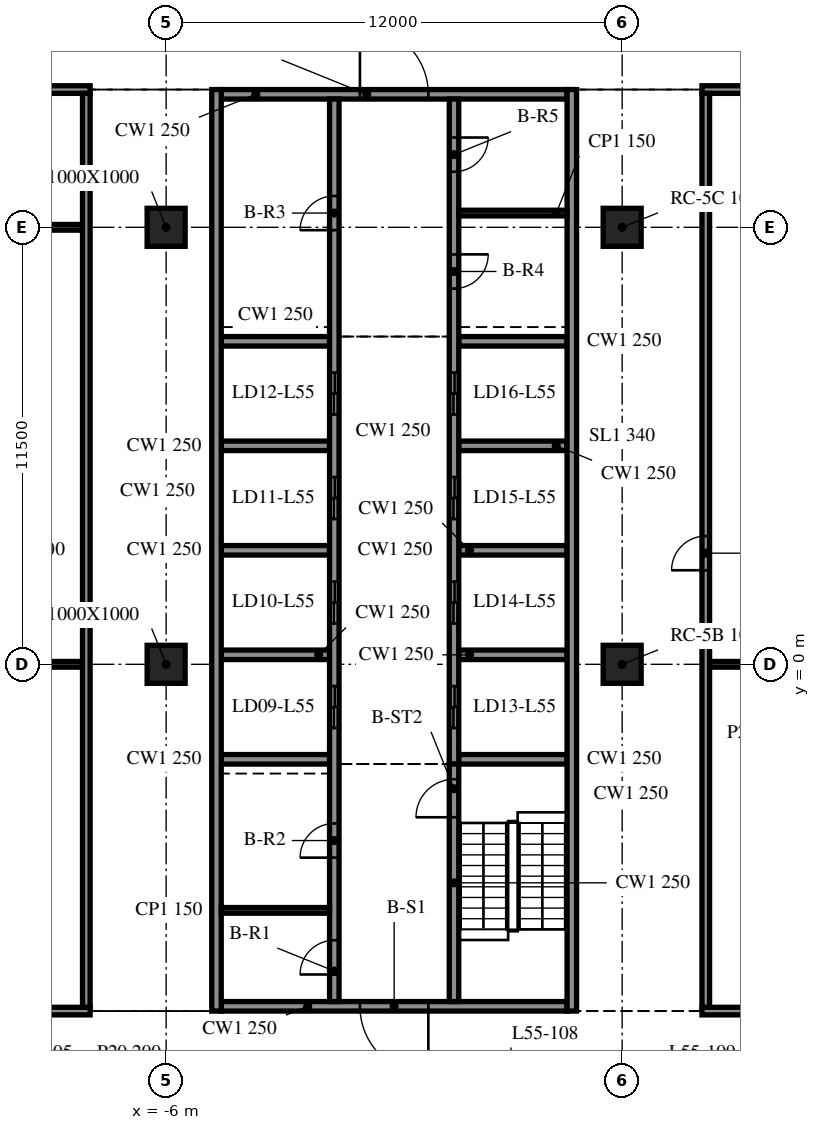
"""IFC4 building model, lengths in metres.
Left out: names, types, materials, properties, quantities, classifications, styles, units other than length and angle.
Written with IfcOpenShell. Run it as: python <this file> out.ifc"""

import sys

from ifc_helpers import new_model, si_unit, direction, frame, frame_2d, origin, origin_2d, place, context, subcontext, project, spatial, rectangle, extrude, element, fill, save


model = new_model("IFC4")
c1 = context("Model", 3, precision=1e-05, world=origin(), true_north=direction((0.0, 1.0)))
c2 = subcontext(c1, "Body", "Model", "MODEL_VIEW")
j1 = project(units=[si_unit("LENGTHUNIT", "METRE"), si_unit("PLANEANGLEUNIT", "RADIAN")], contexts=[c1])
p1 = place(None, origin())
s1 = spatial("IfcSite", under=j1, at=p1, CompositionType="ELEMENT")
p2 = place(p1, origin())
s2 = spatial("IfcBuilding", under=s1, at=p2, CompositionType="ELEMENT")
p3 = place(p2, frame((0.0, 0.0, 228.6)))
s3 = spatial("IfcBuildingStorey", under=s2, at=p3, CompositionType="ELEMENT", Elevation=228.6)
for number, where, z_axis, x_axis in (
    (1, (-6.0, 0.0, -0.34), (0.0, 0.0, 1.0), (1.0, 0.0, 0.0)),
    (2, (-6.0, 11.5, -0.34), (0.0, 0.0, 1.0), (1.0, 0.0, 0.0)),
    (3, (6.0, 0.0, -0.34), (0.0, 0.0, 1.0), (1.0, 0.0, 0.0)),
    (4, (6.0, 11.5, -0.34), (0.0, 0.0, 1.0), (1.0, 0.0, 0.0)),
):
    element("IfcColumn", number, at=place(p3, frame(where, z_axis=z_axis, x_axis=x_axis)), inside=s3, PredefinedType="COLUMN", context=c2, shape_type="SweptSolid", body=[
        extrude(rectangle(XDim=1.0, YDim=1.0, at=origin_2d()), origin(), (0.0, 0.0, 1.0), 3.8),
    ])
for number, where, z_axis, x_axis in (
    (5, (-4.675, 15.125, 0.0), (0.0, 0.0, 1.0), (0.0, -1.0, 0.0)),
    (6, (4.675, -9.125, 0.0), (0.0, 0.0, 1.0), (0.0, 1.0, 0.0)),
):
    element("IfcWall", number, at=place(p3, frame(where, z_axis=z_axis, x_axis=x_axis)), inside=s3, PredefinedType="SOLIDWALL", context=c2, shape_type="SweptSolid", body=[
        extrude(rectangle(XDim=24.25, YDim=0.25, at=frame_2d((12.125, 0.0))), origin(), (0.0, 0.0, 1.0), 3.46),
    ])
p4 = place(p3, frame((4.55, -9.0, 0.0), z_axis=(0.0, 0.0, 1.0), x_axis=(-1.0, 0.0, 0.0)))
e7 = element("IfcWall", 7, at=p4, inside=s3, PredefinedType="SOLIDWALL", context=c2, shape_type="SweptSolid", body=[
    extrude(rectangle(XDim=9.1, YDim=0.25, at=frame_2d((4.55, 0.0))), origin(), (0.0, 0.0, 1.0), 3.46),
])
p5 = place(p4, frame((3.65, 0.0, 0.0)))
e8 = element("IfcOpeningElement", 8, at=p5, cuts=e7, PredefinedType="OPENING", context=c2, shape_type="SweptSolid", body=[
    extrude(rectangle(XDim=1.8, YDim=2.1, at=frame_2d((0.9, 1.05))), frame((0.0, 0.135, 0.0), z_axis=(0.0, -1.0, 0.0), x_axis=(1.0, 0.0, 0.0)), (0.0, 0.0, 1.0), 0.27),
])
p6 = place(p3, frame((-4.55, 15.0, 0.0), z_axis=(0.0, 0.0, 1.0), x_axis=(1.0, 0.0, 0.0)))
e9 = element("IfcWall", 9, at=p6, inside=s3, PredefinedType="SOLIDWALL", context=c2, shape_type="SweptSolid", body=[
    extrude(rectangle(XDim=9.1, YDim=0.25, at=frame_2d((4.55, 0.0))), origin(), (0.0, 0.0, 1.0), 3.46),
])
p7 = place(p6, frame((3.65, 0.0, 0.0)))
e10 = element("IfcOpeningElement", 10, at=p7, cuts=e9, PredefinedType="OPENING", context=c2, shape_type="SweptSolid", body=[
    extrude(rectangle(XDim=1.8, YDim=2.1, at=frame_2d((0.9, 1.05))), frame((0.0, 0.135, 0.0), z_axis=(0.0, -1.0, 0.0), x_axis=(1.0, 0.0, 0.0)), (0.0, 0.0, 1.0), 0.27),
])
p8 = place(p3, frame((-1.575, -8.875, 0.0), z_axis=(0.0, 0.0, 1.0), x_axis=(0.0, 1.0, 0.0)))
e11 = element("IfcWall", 11, at=p8, inside=s3, PredefinedType="SOLIDWALL", context=c2, shape_type="SweptSolid", body=[
    extrude(rectangle(XDim=23.75, YDim=0.25, at=frame_2d((11.875, 0.0))), origin(), (0.0, 0.0, 1.0), 3.46),
])
p9 = place(p8, frame((7.2, 0.0, 0.0)))
e12 = element("IfcOpeningElement", 12, at=p9, cuts=e11, PredefinedType="OPENING", context=c2, shape_type="SweptSolid", body=[
    extrude(rectangle(XDim=1.1, YDim=2.1, at=frame_2d((0.55, 1.05))), frame((0.0, 0.135, 0.0), z_axis=(0.0, -1.0, 0.0), x_axis=(1.0, 0.0, 0.0)), (0.0, 0.0, 1.0), 0.27),
])
p10 = place(p8, frame((9.95, 0.0, 0.0)))
e13 = element("IfcOpeningElement", 13, at=p10, cuts=e11, PredefinedType="OPENING", context=c2, shape_type="SweptSolid", body=[
    extrude(rectangle(XDim=1.1, YDim=2.1, at=frame_2d((0.55, 1.05))), frame((0.0, 0.135, 0.0), z_axis=(0.0, -1.0, 0.0), x_axis=(1.0, 0.0, 0.0)), (0.0, 0.0, 1.0), 0.27),
])
p11 = place(p8, frame((12.7, 0.0, 0.0)))
e14 = element("IfcOpeningElement", 14, at=p11, cuts=e11, PredefinedType="OPENING", context=c2, shape_type="SweptSolid", body=[
    extrude(rectangle(XDim=1.1, YDim=2.1, at=frame_2d((0.55, 1.05))), frame((0.0, 0.135, 0.0), z_axis=(0.0, -1.0, 0.0), x_axis=(1.0, 0.0, 0.0)), (0.0, 0.0, 1.0), 0.27),
])
p12 = place(p8, frame((15.45, 0.0, 0.0)))
e15 = element("IfcOpeningElement", 15, at=p12, cuts=e11, PredefinedType="OPENING", context=c2, shape_type="SweptSolid", body=[
    extrude(rectangle(XDim=1.1, YDim=2.1, at=frame_2d((0.55, 1.05))), frame((0.0, 0.135, 0.0), z_axis=(0.0, -1.0, 0.0), x_axis=(1.0, 0.0, 0.0)), (0.0, 0.0, 1.0), 0.27),
])
p13 = place(p8, frame((0.712, 0.0, 0.0)))
e16 = element("IfcOpeningElement", 16, at=p13, cuts=e11, PredefinedType="OPENING", context=c2, shape_type="SweptSolid", body=[
    extrude(rectangle(XDim=0.9, YDim=2.1, at=frame_2d((0.45, 1.05))), frame((0.0, 0.135, 0.0), z_axis=(0.0, -1.0, 0.0), x_axis=(1.0, 0.0, 0.0)), (0.0, 0.0, 1.0), 0.27),
])
p14 = place(p8, frame((3.788, 0.0, 0.0)))
e17 = element("IfcOpeningElement", 17, at=p14, cuts=e11, PredefinedType="OPENING", context=c2, shape_type="SweptSolid", body=[
    extrude(rectangle(XDim=0.9, YDim=2.1, at=frame_2d((0.45, 1.05))), frame((0.0, 0.135, 0.0), z_axis=(0.0, -1.0, 0.0), x_axis=(1.0, 0.0, 0.0)), (0.0, 0.0, 1.0), 0.27),
])
p15 = place(p8, frame((20.3, 0.0, 0.0)))
e18 = element("IfcOpeningElement", 18, at=p15, cuts=e11, PredefinedType="OPENING", context=c2, shape_type="SweptSolid", body=[
    extrude(rectangle(XDim=0.9, YDim=2.1, at=frame_2d((0.45, 1.05))), frame((0.0, 0.135, 0.0), z_axis=(0.0, -1.0, 0.0), x_axis=(1.0, 0.0, 0.0)), (0.0, 0.0, 1.0), 0.27),
])
p16 = place(p3, frame((1.575, -8.875, 0.0), z_axis=(0.0, 0.0, 1.0), x_axis=(0.0, 1.0, 0.0)))
e19 = element("IfcWall", 19, at=p16, inside=s3, PredefinedType="SOLIDWALL", context=c2, shape_type="SweptSolid", body=[
    extrude(rectangle(XDim=6.25, YDim=0.25, at=frame_2d((3.125, 0.0))), origin(), (0.0, 0.0, 1.0), 3.46),
])
p17 = place(p16, frame((4.85, 0.0, 0.0)))
e20 = element("IfcOpeningElement", 20, at=p17, cuts=e19, PredefinedType="OPENING", context=c2, shape_type="SweptSolid", body=[
    extrude(rectangle(XDim=1.0, YDim=2.1, at=frame_2d((0.5, 1.05))), frame((0.0, 0.135, 0.0), z_axis=(0.0, -1.0, 0.0), x_axis=(1.0, 0.0, 0.0)), (0.0, 0.0, 1.0), 0.27),
])
p18 = place(p3, frame((1.575, 14.875, 0.0), z_axis=(0.0, 0.0, 1.0), x_axis=(0.0, -1.0, 0.0)))
e21 = element("IfcWall", 21, at=p18, inside=s3, PredefinedType="SOLIDWALL", context=c2, shape_type="SweptSolid", body=[
    extrude(rectangle(XDim=17.5, YDim=0.25, at=frame_2d((8.75, 0.0))), origin(), (0.0, 0.0, 1.0), 3.46),
])
p19 = place(p18, frame((15.45, 0.0, 0.0)))
e22 = element("IfcOpeningElement", 22, at=p19, cuts=e21, PredefinedType="OPENING", context=c2, shape_type="SweptSolid", body=[
    extrude(rectangle(XDim=1.1, YDim=2.1, at=frame_2d((0.55, 1.05))), frame((0.0, 0.135, 0.0), z_axis=(0.0, -1.0, 0.0), x_axis=(1.0, 0.0, 0.0)), (0.0, 0.0, 1.0), 0.27),
])
p20 = place(p18, frame((12.7, 0.0, 0.0)))
e23 = element("IfcOpeningElement", 23, at=p20, cuts=e21, PredefinedType="OPENING", context=c2, shape_type="SweptSolid", body=[
    extrude(rectangle(XDim=1.1, YDim=2.1, at=frame_2d((0.55, 1.05))), frame((0.0, 0.135, 0.0), z_axis=(0.0, -1.0, 0.0), x_axis=(1.0, 0.0, 0.0)), (0.0, 0.0, 1.0), 0.27),
])
p21 = place(p18, frame((9.95, 0.0, 0.0)))
e24 = element("IfcOpeningElement", 24, at=p21, cuts=e21, PredefinedType="OPENING", context=c2, shape_type="SweptSolid", body=[
    extrude(rectangle(XDim=1.1, YDim=2.1, at=frame_2d((0.55, 1.05))), frame((0.0, 0.135, 0.0), z_axis=(0.0, -1.0, 0.0), x_axis=(1.0, 0.0, 0.0)), (0.0, 0.0, 1.0), 0.27),
])
p22 = place(p18, frame((7.2, 0.0, 0.0)))
e25 = element("IfcOpeningElement", 25, at=p22, cuts=e21, PredefinedType="OPENING", context=c2, shape_type="SweptSolid", body=[
    extrude(rectangle(XDim=1.1, YDim=2.1, at=frame_2d((0.55, 1.05))), frame((0.0, 0.135, 0.0), z_axis=(0.0, -1.0, 0.0), x_axis=(1.0, 0.0, 0.0)), (0.0, 0.0, 1.0), 0.27),
])
p23 = place(p18, frame((4.087, 0.0, 0.0)))
e26 = element("IfcOpeningElement", 26, at=p23, cuts=e21, PredefinedType="OPENING", context=c2, shape_type="SweptSolid", body=[
    extrude(rectangle(XDim=0.9, YDim=2.1, at=frame_2d((0.45, 1.05))), frame((0.0, 0.135, 0.0), z_axis=(0.0, -1.0, 0.0), x_axis=(1.0, 0.0, 0.0)), (0.0, 0.0, 1.0), 0.27),
])
p24 = place(p18, frame((1.012, 0.0, 0.0)))
e27 = element("IfcOpeningElement", 27, at=p24, cuts=e21, PredefinedType="OPENING", context=c2, shape_type="SweptSolid", body=[
    extrude(rectangle(XDim=0.9, YDim=2.1, at=frame_2d((0.45, 1.05))), frame((0.0, 0.135, 0.0), z_axis=(0.0, -1.0, 0.0), x_axis=(1.0, 0.0, 0.0)), (0.0, 0.0, 1.0), 0.27),
])
for number, where, z_axis, x_axis in (
    (28, (-4.55, -2.5, 0.0), (0.0, 0.0, 1.0), (1.0, 0.0, 0.0)),
    (29, (-4.55, 0.25, 0.0), (0.0, 0.0, 1.0), (1.0, 0.0, 0.0)),
    (30, (-4.55, 3.0, 0.0), (0.0, 0.0, 1.0), (1.0, 0.0, 0.0)),
    (31, (-4.55, 5.75, 0.0), (0.0, 0.0, 1.0), (1.0, 0.0, 0.0)),
    (32, (-4.55, 8.5, 0.0), (0.0, 0.0, 1.0), (1.0, 0.0, 0.0)),
    (33, (1.7, -2.5, 0.0), (0.0, 0.0, 1.0), (1.0, 0.0, 0.0)),
    (34, (1.7, 0.25, 0.0), (0.0, 0.0, 1.0), (1.0, 0.0, 0.0)),
    (35, (1.7, 3.0, 0.0), (0.0, 0.0, 1.0), (1.0, 0.0, 0.0)),
    (36, (1.7, 5.75, 0.0), (0.0, 0.0, 1.0), (1.0, 0.0, 0.0)),
    (37, (1.7, 8.5, 0.0), (0.0, 0.0, 1.0), (1.0, 0.0, 0.0)),
):
    element("IfcWall", number, at=place(p3, frame(where, z_axis=z_axis, x_axis=x_axis)), inside=s3, PredefinedType="SOLIDWALL", context=c2, shape_type="SweptSolid", body=[
        extrude(rectangle(XDim=2.85, YDim=0.25, at=frame_2d((1.425, 0.0))), origin(), (0.0, 0.0, 1.0), 3.46),
    ])
for number, where, z_axis, x_axis in (
    (38, (-4.55, -6.475, 0.0), (0.0, 0.0, 1.0), (1.0, 0.0, 0.0)),
    (39, (1.7, 11.875, 0.0), (0.0, 0.0, 1.0), (1.0, 0.0, 0.0)),
):
    element("IfcWall", number, at=place(p3, frame(where, z_axis=z_axis, x_axis=x_axis)), inside=s3, PredefinedType="PARTITIONING", context=c2, shape_type="SweptSolid", body=[
        extrude(rectangle(XDim=2.85, YDim=0.15, at=frame_2d((1.425, 0.0))), origin(), (0.0, 0.0, 1.0), 3.46),
    ])
p25 = place(p3, frame((-16.1, -9.125, 0.0), z_axis=(0.0, 0.0, 1.0), x_axis=(1.0, 0.0, 0.0)))
e40 = element("IfcWall", 40, at=p25, inside=s3, PredefinedType="PARTITIONING", context=c2, shape_type="SweptSolid", body=[
    extrude(rectangle(XDim=8.1, YDim=0.2, at=frame_2d((4.05, 0.0))), origin(), (0.0, 0.0, 1.0), 3.46),
])
p26 = place(p25, frame((3.5, 0.0, 0.0)))
e41 = element("IfcOpeningElement", 41, at=p26, cuts=e40, PredefinedType="OPENING", context=c2, shape_type="SweptSolid", body=[
    extrude(rectangle(XDim=0.9, YDim=2.1, at=frame_2d((0.45, 1.05))), frame((0.0, 0.11, 0.0), z_axis=(0.0, -1.0, 0.0), x_axis=(1.0, 0.0, 0.0)), (0.0, 0.0, 1.0), 0.22),
])
p27 = place(p3, frame((8.1, -9.125, 0.0), z_axis=(0.0, 0.0, 1.0), x_axis=(1.0, 0.0, 0.0)))
e42 = element("IfcWall", 42, at=p27, inside=s3, PredefinedType="PARTITIONING", context=c2, shape_type="SweptSolid", body=[
    extrude(rectangle(XDim=7.7, YDim=0.2, at=frame_2d((3.85, 0.0))), origin(), (0.0, 0.0, 1.0), 3.46),
])
p28 = place(p27, frame((3.3, 0.0, 0.0)))
e43 = element("IfcOpeningElement", 43, at=p28, cuts=e42, PredefinedType="OPENING", context=c2, shape_type="SweptSolid", body=[
    extrude(rectangle(XDim=0.9, YDim=2.1, at=frame_2d((0.45, 1.05))), frame((0.0, 0.11, 0.0), z_axis=(0.0, -1.0, 0.0), x_axis=(1.0, 0.0, 0.0)), (0.0, 0.0, 1.0), 0.22),
])
p29 = place(p3, frame((-15.9, 0.0, 0.0), z_axis=(0.0, 0.0, 1.0), x_axis=(1.0, 0.0, 0.0)))
e44 = element("IfcWall", 44, at=p29, inside=s3, PredefinedType="PARTITIONING", context=c2, shape_type="SweptSolid", body=[
    extrude(rectangle(XDim=7.7, YDim=0.15, at=frame_2d((3.85, 0.0))), origin(), (0.0, 0.0, 1.0), 3.46),
])
p30 = place(p3, frame((8.3, 0.0, 0.0), z_axis=(0.0, 0.0, 1.0), x_axis=(1.0, 0.0, 0.0)))
e45 = element("IfcWall", 45, at=p30, inside=s3, PredefinedType="PARTITIONING", context=c2, shape_type="SweptSolid", body=[
    extrude(rectangle(XDim=7.3, YDim=0.15, at=frame_2d((3.65, 0.0))), origin(), (0.0, 0.0, 1.0), 3.46),
])
p31 = place(p3, frame((-15.9, 11.5, 0.0), z_axis=(0.0, 0.0, 1.0), x_axis=(1.0, 0.0, 0.0)))
e46 = element("IfcWall", 46, at=p31, inside=s3, PredefinedType="PARTITIONING", context=c2, shape_type="SweptSolid", body=[
    extrude(rectangle(XDim=7.7, YDim=0.15, at=frame_2d((3.85, 0.0))), origin(), (0.0, 0.0, 1.0), 3.46),
])
p32 = place(p3, frame((-16.1, 15.125, 0.0), z_axis=(0.0, 0.0, 1.0), x_axis=(1.0, 0.0, 0.0)))
e47 = element("IfcWall", 47, at=p32, inside=s3, PredefinedType="PARTITIONING", context=c2, shape_type="SweptSolid", body=[
    extrude(rectangle(XDim=8.1, YDim=0.2, at=frame_2d((4.05, 0.0))), origin(), (0.0, 0.0, 1.0), 3.46),
])
p33 = place(p32, frame((3.5, 0.0, 0.0)))
e48 = element("IfcOpeningElement", 48, at=p33, cuts=e47, PredefinedType="OPENING", context=c2, shape_type="SweptSolid", body=[
    extrude(rectangle(XDim=1.0, YDim=2.1, at=frame_2d((0.5, 1.05))), frame((0.0, 0.11, 0.0), z_axis=(0.0, -1.0, 0.0), x_axis=(1.0, 0.0, 0.0)), (0.0, 0.0, 1.0), 0.22),
])
p34 = place(p3, frame((8.1, 15.125, 0.0), z_axis=(0.0, 0.0, 1.0), x_axis=(1.0, 0.0, 0.0)))
e49 = element("IfcWall", 49, at=p34, inside=s3, PredefinedType="PARTITIONING", context=c2, shape_type="SweptSolid", body=[
    extrude(rectangle(XDim=7.7, YDim=0.2, at=frame_2d((3.85, 0.0))), origin(), (0.0, 0.0, 1.0), 3.46),
])
p35 = place(p3, frame((-8.1, -9.025, 0.0), z_axis=(0.0, 0.0, 1.0), x_axis=(0.0, 1.0, 0.0)))
e50 = element("IfcWall", 50, at=p35, inside=s3, PredefinedType="PARTITIONING", context=c2, shape_type="SweptSolid", body=[
    extrude(rectangle(XDim=24.05, YDim=0.2, at=frame_2d((12.025, 0.0))), origin(), (0.0, 0.0, 1.0), 3.46),
])
p36 = place(p3, frame((8.2, -9.025, 0.0), z_axis=(0.0, 0.0, 1.0), x_axis=(0.0, 1.0, 0.0)))
e51 = element("IfcWall", 51, at=p36, inside=s3, PredefinedType="PARTITIONING", context=c2, shape_type="SweptSolid", body=[
    extrude(rectangle(XDim=24.05, YDim=0.2, at=frame_2d((12.025, 0.0))), origin(), (0.0, 0.0, 1.0), 3.46),
])
p37 = place(p36, frame((11.5, 0.0, 0.0)))
e52 = element("IfcOpeningElement", 52, at=p37, cuts=e51, PredefinedType="OPENING", context=c2, shape_type="SweptSolid", body=[
    extrude(rectangle(XDim=0.9, YDim=2.1, at=frame_2d((0.45, 1.05))), frame((0.0, 0.11, 0.0), z_axis=(0.0, -1.0, 0.0), x_axis=(1.0, 0.0, 0.0)), (0.0, 0.0, 1.0), 0.22),
])
p38 = place(p5, origin())
e53 = element("IfcDoor", 53, at=p38, inside=s3, OperationType="DOUBLE_DOOR_SINGLE_SWING", PredefinedType="DOOR", context=c2, shape_type="SweptSolid", body=[
    extrude(rectangle(XDim=1.8, YDim=2.1, at=frame_2d((0.9, 1.05))), frame((0.0, 0.025, 0.0), z_axis=(0.0, -1.0, 0.0), x_axis=(1.0, 0.0, 0.0)), (0.0, 0.0, 1.0), 0.05),
])
fill(e8, e53)
p39 = place(p7, origin())
e54 = element("IfcDoor", 54, at=p39, inside=s3, OperationType="DOUBLE_DOOR_SINGLE_SWING", PredefinedType="DOOR", context=c2, shape_type="SweptSolid", body=[
    extrude(rectangle(XDim=1.8, YDim=2.1, at=frame_2d((0.9, 1.05))), frame((0.0, 0.025, 0.0), z_axis=(0.0, -1.0, 0.0), x_axis=(1.0, 0.0, 0.0)), (0.0, 0.0, 1.0), 0.05),
])
fill(e10, e54)
p40 = place(p19, origin())
e55 = element("IfcDoor", 55, at=p40, inside=s3, OperationType="DOUBLE_DOOR_SLIDING", PredefinedType="DOOR", context=c2, shape_type="SweptSolid", body=[
    extrude(rectangle(XDim=1.1, YDim=2.1, at=frame_2d((0.55, 1.05))), frame((0.0, 0.025, 0.0), z_axis=(0.0, -1.0, 0.0), x_axis=(1.0, 0.0, 0.0)), (0.0, 0.0, 1.0), 0.05),
])
fill(e22, e55)
p41 = place(p20, origin())
e56 = element("IfcDoor", 56, at=p41, inside=s3, OperationType="DOUBLE_DOOR_SLIDING", PredefinedType="DOOR", context=c2, shape_type="SweptSolid", body=[
    extrude(rectangle(XDim=1.1, YDim=2.1, at=frame_2d((0.55, 1.05))), frame((0.0, 0.025, 0.0), z_axis=(0.0, -1.0, 0.0), x_axis=(1.0, 0.0, 0.0)), (0.0, 0.0, 1.0), 0.05),
])
fill(e23, e56)
p42 = place(p21, origin())
e57 = element("IfcDoor", 57, at=p42, inside=s3, OperationType="DOUBLE_DOOR_SLIDING", PredefinedType="DOOR", context=c2, shape_type="SweptSolid", body=[
    extrude(rectangle(XDim=1.1, YDim=2.1, at=frame_2d((0.55, 1.05))), frame((0.0, 0.025, 0.0), z_axis=(0.0, -1.0, 0.0), x_axis=(1.0, 0.0, 0.0)), (0.0, 0.0, 1.0), 0.05),
])
fill(e24, e57)
p43 = place(p22, origin())
e58 = element("IfcDoor", 58, at=p43, inside=s3, OperationType="DOUBLE_DOOR_SLIDING", PredefinedType="DOOR", context=c2, shape_type="SweptSolid", body=[
    extrude(rectangle(XDim=1.1, YDim=2.1, at=frame_2d((0.55, 1.05))), frame((0.0, 0.025, 0.0), z_axis=(0.0, -1.0, 0.0), x_axis=(1.0, 0.0, 0.0)), (0.0, 0.0, 1.0), 0.05),
])
fill(e25, e58)
p44 = place(p9, origin())
e59 = element("IfcDoor", 59, at=p44, inside=s3, OperationType="DOUBLE_DOOR_SLIDING", PredefinedType="DOOR", context=c2, shape_type="SweptSolid", body=[
    extrude(rectangle(XDim=1.1, YDim=2.1, at=frame_2d((0.55, 1.05))), frame((0.0, 0.025, 0.0), z_axis=(0.0, -1.0, 0.0), x_axis=(1.0, 0.0, 0.0)), (0.0, 0.0, 1.0), 0.05),
])
fill(e12, e59)
p45 = place(p10, origin())
e60 = element("IfcDoor", 60, at=p45, inside=s3, OperationType="DOUBLE_DOOR_SLIDING", PredefinedType="DOOR", context=c2, shape_type="SweptSolid", body=[
    extrude(rectangle(XDim=1.1, YDim=2.1, at=frame_2d((0.55, 1.05))), frame((0.0, 0.025, 0.0), z_axis=(0.0, -1.0, 0.0), x_axis=(1.0, 0.0, 0.0)), (0.0, 0.0, 1.0), 0.05),
])
fill(e13, e60)
p46 = place(p11, origin())
e61 = element("IfcDoor", 61, at=p46, inside=s3, OperationType="DOUBLE_DOOR_SLIDING", PredefinedType="DOOR", context=c2, shape_type="SweptSolid", body=[
    extrude(rectangle(XDim=1.1, YDim=2.1, at=frame_2d((0.55, 1.05))), frame((0.0, 0.025, 0.0), z_axis=(0.0, -1.0, 0.0), x_axis=(1.0, 0.0, 0.0)), (0.0, 0.0, 1.0), 0.05),
])
fill(e14, e61)
p47 = place(p12, origin())
e62 = element("IfcDoor", 62, at=p47, inside=s3, OperationType="DOUBLE_DOOR_SLIDING", PredefinedType="DOOR", context=c2, shape_type="SweptSolid", body=[
    extrude(rectangle(XDim=1.1, YDim=2.1, at=frame_2d((0.55, 1.05))), frame((0.0, 0.025, 0.0), z_axis=(0.0, -1.0, 0.0), x_axis=(1.0, 0.0, 0.0)), (0.0, 0.0, 1.0), 0.05),
])
fill(e15, e62)
p48 = place(p13, origin())
e63 = element("IfcDoor", 63, at=p48, inside=s3, OperationType="SINGLE_SWING_LEFT", PredefinedType="DOOR", context=c2, shape_type="SweptSolid", body=[
    extrude(rectangle(XDim=0.9, YDim=2.1, at=frame_2d((0.45, 1.05))), frame((0.0, 0.025, 0.0), z_axis=(0.0, -1.0, 0.0), x_axis=(1.0, 0.0, 0.0)), (0.0, 0.0, 1.0), 0.05),
])
fill(e16, e63)
p49 = place(p14, origin())
e64 = element("IfcDoor", 64, at=p49, inside=s3, OperationType="SINGLE_SWING_RIGHT", PredefinedType="DOOR", context=c2, shape_type="SweptSolid", body=[
    extrude(rectangle(XDim=0.9, YDim=2.1, at=frame_2d((0.45, 1.05))), frame((0.0, 0.025, 0.0), z_axis=(0.0, -1.0, 0.0), x_axis=(1.0, 0.0, 0.0)), (0.0, 0.0, 1.0), 0.05),
])
fill(e17, e64)
p50 = place(p15, origin())
e65 = element("IfcDoor", 65, at=p50, inside=s3, OperationType="SINGLE_SWING_LEFT", PredefinedType="DOOR", context=c2, shape_type="SweptSolid", body=[
    extrude(rectangle(XDim=0.9, YDim=2.1, at=frame_2d((0.45, 1.05))), frame((0.0, 0.025, 0.0), z_axis=(0.0, -1.0, 0.0), x_axis=(1.0, 0.0, 0.0)), (0.0, 0.0, 1.0), 0.05),
])
fill(e18, e65)
p51 = place(p23, origin())
e66 = element("IfcDoor", 66, at=p51, inside=s3, OperationType="SINGLE_SWING_RIGHT", PredefinedType="DOOR", context=c2, shape_type="SweptSolid", body=[
    extrude(rectangle(XDim=0.9, YDim=2.1, at=frame_2d((0.45, 1.05))), frame((0.0, 0.025, 0.0), z_axis=(0.0, -1.0, 0.0), x_axis=(1.0, 0.0, 0.0)), (0.0, 0.0, 1.0), 0.05),
])
fill(e26, e66)
p52 = place(p24, origin())
e67 = element("IfcDoor", 67, at=p52, inside=s3, OperationType="SINGLE_SWING_LEFT", PredefinedType="DOOR", context=c2, shape_type="SweptSolid", body=[
    extrude(rectangle(XDim=0.9, YDim=2.1, at=frame_2d((0.45, 1.05))), frame((0.0, 0.025, 0.0), z_axis=(0.0, -1.0, 0.0), x_axis=(1.0, 0.0, 0.0)), (0.0, 0.0, 1.0), 0.05),
])
fill(e27, e67)
p53 = place(p17, origin())
e68 = element("IfcDoor", 68, at=p53, inside=s3, OperationType="SINGLE_SWING_RIGHT", PredefinedType="DOOR", context=c2, shape_type="SweptSolid", body=[
    extrude(rectangle(XDim=1.0, YDim=2.1, at=frame_2d((0.5, 1.05))), frame((0.0, 0.025, 0.0), z_axis=(0.0, -1.0, 0.0), x_axis=(1.0, 0.0, 0.0)), (0.0, 0.0, 1.0), 0.05),
])
fill(e20, e68)
p54 = place(p37, origin())
e69 = element("IfcDoor", 69, at=p54, inside=s3, OperationType="SINGLE_SWING_RIGHT", PredefinedType="DOOR", context=c2, shape_type="SweptSolid", body=[
    extrude(rectangle(XDim=0.9, YDim=2.1, at=frame_2d((0.45, 1.05))), frame((0.0, 0.025, 0.0), z_axis=(0.0, -1.0, 0.0), x_axis=(1.0, 0.0, 0.0)), (0.0, 0.0, 1.0), 0.05),
])
fill(e52, e69)
save(model, sys.argv[1])
